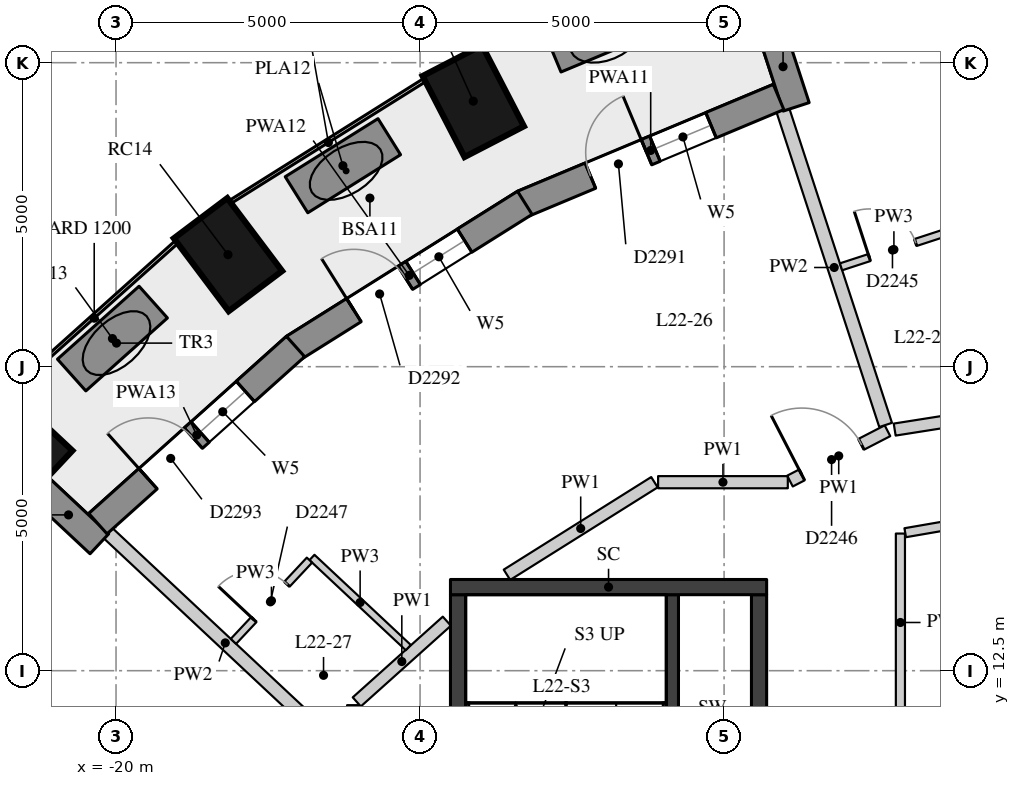
"""IFC4 building model, lengths in metres.
Left out: names, types, materials, properties, quantities, classifications, styles, units other than length and angle.
Written with IfcOpenShell. Run it as: python <this file> out.ifc"""

import sys

from ifc_helpers import new_model, si_unit, direction, frame, frame_2d, origin, origin_2d, place, context, subcontext, project, spatial, rectangle, extrude, element, fill, save


model = new_model("IFC4")
c1 = context("Model", 3, precision=1e-05, world=origin(), true_north=direction((0.0, 1.0)))
c2 = subcontext(c1, "Body", "Model", "MODEL_VIEW")
j1 = project(units=[si_unit("LENGTHUNIT", "METRE"), si_unit("PLANEANGLEUNIT", "RADIAN")], contexts=[c1])
p1 = place(None, origin())
s1 = spatial("IfcSite", under=j1, at=p1, CompositionType="ELEMENT")
p2 = place(p1, origin())
s2 = spatial("IfcBuilding", under=s1, at=p2, CompositionType="ELEMENT")
p3 = place(p2, frame((0.0, 0.0, 81.1)))
s3 = spatial("IfcBuildingStorey", under=s2, at=p3, CompositionType="ELEMENT", Elevation=81.1)
for number, where, z_axis, x_axis in (
    (1, (-14.125, 21.867, 0.0), (0.0, 0.0, 1.0), (-0.46, 0.888, 0.0)),
    (2, (-18.159, 19.343, 0.0), (0.0, 0.0, 1.0), (-0.601, 0.799, 0.0)),
    (3, (-21.641, 16.23, 0.0), (0.0, 0.0, 1.0), (-0.73, 0.683, 0.0)),
):
    element("IfcColumn", number, at=place(p3, frame(where, z_axis=z_axis, x_axis=x_axis)), inside=s3, PredefinedType="COLUMN", context=c2, shape_type="SweptSolid", body=[
        extrude(rectangle(XDim=1.5, YDim=1.1, at=origin_2d()), origin(), (0.0, 0.0, 1.0), 3.3),
    ])
p4 = place(p3, frame((-9.246, 23.095, 0.0), z_axis=(0.0, 0.0, 1.0), x_axis=(0.310110311429, -0.950700581017, 0.0)))
e4 = element("IfcWall", 4, at=p4, inside=s3, PredefinedType="SOLIDWALL", context=c2, shape_type="SweptSolid", body=[
    extrude(rectangle(XDim=1.39, YDim=0.45, at=frame_2d((0.695, 0.0))), origin(), (0.0, 0.0, 1.0), 2.85),
])
p5 = place(p3, frame((-21.289, 15.538, 0.0), z_axis=(0.0, 0.0, 1.0), x_axis=(0.730149942784, -0.683286953668, 0.0)))
e5 = element("IfcWall", 5, at=p5, inside=s3, PredefinedType="SOLIDWALL", context=c2, shape_type="SweptSolid", body=[
    extrude(rectangle(XDim=1.391, YDim=0.45, at=frame_2d((0.695, 0.0))), origin(), (0.0, 0.0, 1.0), 2.85),
])
p6 = place(p3, frame((-9.104, 21.936, 0.0), z_axis=(0.0, 0.0, 1.0), x_axis=(-0.922645368502, -0.385649483317, 0.0)))
e6 = element("IfcWall", 6, at=p6, inside=s3, PredefinedType="SOLIDWALL", context=c2, shape_type="SweptSolid", body=[
    extrude(rectangle(XDim=4.559, YDim=0.45, at=frame_2d((2.279, 0.0))), origin(), (0.0, 0.0, 1.0), 2.85),
])
p7 = place(p6, frame((1.204, 0.0, 0.4)))
e7 = element("IfcOpeningElement", 7, at=p7, cuts=e6, PredefinedType="OPENING", context=c2, shape_type="SweptSolid", body=[
    extrude(rectangle(XDim=1.0, YDim=1.75, at=frame_2d((0.5, 0.875))), frame((0.0, 0.235, 0.0), z_axis=(0.0, -1.0, 0.0), x_axis=(1.0, 0.0, 0.0)), (0.0, 0.0, 1.0), 0.47),
])
p8 = place(p6, frame((2.354, 0.0, 0.0)))
e8 = element("IfcOpeningElement", 8, at=p8, cuts=e6, PredefinedType="OPENING", context=c2, shape_type="SweptSolid", body=[
    extrude(rectangle(XDim=1.0, YDim=2.15, at=frame_2d((0.5, 1.075))), frame((0.0, 0.235, 0.0), z_axis=(0.0, -1.0, 0.0), x_axis=(1.0, 0.0, 0.0)), (0.0, 0.0, 1.0), 0.47),
])
p9 = place(p3, frame((-13.277, 20.195, 0.0), z_axis=(0.0, 0.0, 1.0), x_axis=(-0.846976005863, -0.531631117874, 0.0)))
e9 = element("IfcWall", 9, at=p9, inside=s3, PredefinedType="SOLIDWALL", context=c2, shape_type="SweptSolid", body=[
    extrude(rectangle(XDim=4.488, YDim=0.45, at=frame_2d((2.244, 0.0))), origin(), (0.0, 0.0, 1.0), 2.85),
])
p10 = place(p9, frame((1.169, 0.0, 0.4)))
e10 = element("IfcOpeningElement", 10, at=p10, cuts=e9, PredefinedType="OPENING", context=c2, shape_type="SweptSolid", body=[
    extrude(rectangle(XDim=1.0, YDim=1.75, at=frame_2d((0.5, 0.875))), frame((0.0, 0.235, 0.0), z_axis=(0.0, -1.0, 0.0), x_axis=(1.0, 0.0, 0.0)), (0.0, 0.0, 1.0), 0.47),
])
p11 = place(p9, frame((2.319, 0.0, 0.0)))
e11 = element("IfcOpeningElement", 11, at=p11, cuts=e9, PredefinedType="OPENING", context=c2, shape_type="SweptSolid", body=[
    extrude(rectangle(XDim=1.0, YDim=2.15, at=frame_2d((0.5, 1.075))), frame((0.0, 0.235, 0.0), z_axis=(0.0, -1.0, 0.0), x_axis=(1.0, 0.0, 0.0)), (0.0, 0.0, 1.0), 0.47),
])
p12 = place(p3, frame((-17.048, 17.832, 0.0), z_axis=(0.0, 0.0, 1.0), x_axis=(-0.744619286768, -0.667489413978, 0.0)))
e12 = element("IfcWall", 12, at=p12, inside=s3, PredefinedType="SOLIDWALL", context=c2, shape_type="SweptSolid", body=[
    extrude(rectangle(XDim=4.365, YDim=0.45, at=frame_2d((2.183, 0.0))), origin(), (0.0, 0.0, 1.0), 2.85),
])
p13 = place(p12, frame((1.107, 0.0, 0.4)))
e13 = element("IfcOpeningElement", 13, at=p13, cuts=e12, PredefinedType="OPENING", context=c2, shape_type="SweptSolid", body=[
    extrude(rectangle(XDim=1.0, YDim=1.75, at=frame_2d((0.5, 0.875))), frame((0.0, 0.235, 0.0), z_axis=(0.0, -1.0, 0.0), x_axis=(1.0, 0.0, 0.0)), (0.0, 0.0, 1.0), 0.47),
])
p14 = place(p12, frame((2.258, 0.0, 0.0)))
e14 = element("IfcOpeningElement", 14, at=p14, cuts=e12, PredefinedType="OPENING", context=c2, shape_type="SweptSolid", body=[
    extrude(rectangle(XDim=1.0, YDim=2.15, at=frame_2d((0.5, 1.075))), frame((0.0, 0.235, 0.0), z_axis=(0.0, -1.0, 0.0), x_axis=(1.0, 0.0, 0.0)), (0.0, 0.0, 1.0), 0.47),
])
p15 = place(p3, frame((-11.155, 23.362, 0.0), z_axis=(0.0, 0.0, 1.0), x_axis=(-0.923000660042, -0.384798364811, 0.0)))
e15 = element("IfcWall", 15, at=p15, inside=s3, PredefinedType="USERDEFINED", context=c2, shape_type="SweptSolid", body=[
    extrude(rectangle(XDim=1.8, YDim=0.7, at=frame_2d((0.9, 0.0))), origin(), (0.0, 0.0, 1.0), 0.75),
])
p16 = place(p3, frame((-15.506, 21.283, 0.0), z_axis=(0.0, 0.0, 1.0), x_axis=(-0.847609446823, -0.530620604252, 0.0)))
e16 = element("IfcWall", 16, at=p16, inside=s3, PredefinedType="USERDEFINED", context=c2, shape_type="SweptSolid", body=[
    extrude(rectangle(XDim=1.8, YDim=0.7, at=frame_2d((0.9, 0.0))), origin(), (0.0, 0.0, 1.0), 0.75),
])
p17 = place(p3, frame((-19.388, 18.562, 0.0), z_axis=(0.0, 0.0, 1.0), x_axis=(-0.745535653445, -0.666465745139, 0.0)))
e17 = element("IfcWall", 17, at=p17, inside=s3, PredefinedType="USERDEFINED", context=c2, shape_type="SweptSolid", body=[
    extrude(rectangle(XDim=1.8, YDim=0.7, at=frame_2d((0.9, 0.0))), origin(), (0.0, 0.0, 1.0), 0.75),
])
p18 = place(p3, frame((-10.85, 7.75, 0.0), z_axis=(0.0, 0.0, 1.0), x_axis=(0.0, 1.0, 0.0)))
e18 = element("IfcWall", 18, at=p18, inside=s3, PredefinedType="SHEAR", context=c2, shape_type="SweptSolid", body=[
    extrude(rectangle(XDim=6.0, YDim=0.2, at=frame_2d((3.0, 0.0))), origin(), (0.0, 0.0, 1.0), 2.85),
])
p19 = place(p18, frame((0.1, 0.0, 0.0)))
e19 = element("IfcOpeningElement", 19, at=p19, cuts=e18, PredefinedType="OPENING", context=c2, shape_type="SweptSolid", body=[
    extrude(rectangle(XDim=1.5, YDim=2.1, at=frame_2d((0.75, 1.05))), frame((0.0, 0.11, 0.0), z_axis=(0.0, -1.0, 0.0), x_axis=(1.0, 0.0, 0.0)), (0.0, 0.0, 1.0), 0.22),
])
p20 = place(p3, frame((-14.375, 7.75, -0.28), z_axis=(0.0, 0.0, 1.0), x_axis=(0.0, 1.0, 0.0)))
e20 = element("IfcWall", 20, at=p20, inside=s3, PredefinedType="SHEAR", context=c2, shape_type="SweptSolid", body=[
    extrude(rectangle(XDim=6.0, YDim=0.25, at=frame_2d((3.0, 0.0))), origin(), (0.0, 0.0, 1.0), 3.13),
])
p21 = place(p3, frame((-9.425, 7.75, -0.28), z_axis=(0.0, 0.0, 1.0), x_axis=(0.0, 1.0, 0.0)))
e21 = element("IfcWall", 21, at=p21, inside=s3, PredefinedType="SHEAR", context=c2, shape_type="SweptSolid", body=[
    extrude(rectangle(XDim=6.0, YDim=0.25, at=frame_2d((3.0, 0.0))), origin(), (0.0, 0.0, 1.0), 3.13),
])
p22 = place(p21, frame((2.1, 0.0, 0.28)))
e22 = element("IfcOpeningElement", 22, at=p22, cuts=e21, PredefinedType="OPENING", context=c2, shape_type="SweptSolid", body=[
    extrude(rectangle(XDim=1.5, YDim=2.1, at=frame_2d((0.75, 1.05))), frame((0.0, 0.135, 0.0), z_axis=(0.0, -1.0, 0.0), x_axis=(1.0, 0.0, 0.0)), (0.0, 0.0, 1.0), 0.27),
])
p23 = place(p3, frame((-14.5, 13.875, -0.28), z_axis=(0.0, 0.0, 1.0), x_axis=(1.0, 0.0, 0.0)))
e23 = element("IfcWall", 23, at=p23, inside=s3, PredefinedType="SHEAR", context=c2, shape_type="SweptSolid", body=[
    extrude(rectangle(XDim=5.2, YDim=0.25, at=frame_2d((2.6, 0.0))), origin(), (0.0, 0.0, 1.0), 3.13),
])
p24 = place(p3, frame((-16.1, 10.592, 0.0), z_axis=(0.0, 0.0, 1.0), x_axis=(0.0, 1.0, 0.0)))
e24 = element("IfcWall", 24, at=p24, inside=s3, PredefinedType="PARTITIONING", context=c2, shape_type="SweptSolid", body=[
    extrude(rectangle(XDim=1.341, YDim=0.2, at=frame_2d((0.67, 0.0))), origin(), (0.0, 0.0, 1.0), 2.85),
])
p25 = place(p3, frame((-16.041, 11.987, 0.0), z_axis=(0.0, 0.0, 1.0), x_axis=(0.744714584968, 0.66738308859, 0.0)))
e25 = element("IfcWall", 25, at=p25, inside=s3, PredefinedType="PARTITIONING", context=c2, shape_type="SweptSolid", body=[
    extrude(rectangle(XDim=1.989, YDim=0.2, at=frame_2d((0.995, 0.0))), origin(), (0.0, 0.0, 1.0), 2.85),
])
p26 = place(p3, frame((-13.571, 14.077, 0.0), z_axis=(0.0, 0.0, 1.0), x_axis=(0.84693819774, 0.53169134769, 0.0)))
e26 = element("IfcWall", 26, at=p26, inside=s3, PredefinedType="PARTITIONING", context=c2, shape_type="SweptSolid", body=[
    extrude(rectangle(XDim=2.864, YDim=0.2, at=frame_2d((1.432, 0.0))), origin(), (0.0, 0.0, 1.0), 2.85),
])
p27 = place(p3, frame((-11.085, 15.6, 0.0), z_axis=(0.0, 0.0, 1.0), x_axis=(1.0, 0.0, 0.0)))
e27 = element("IfcWall", 27, at=p27, inside=s3, PredefinedType="PARTITIONING", context=c2, shape_type="SweptSolid", body=[
    extrude(rectangle(XDim=2.133, YDim=0.2, at=frame_2d((1.067, 0.0))), origin(), (0.0, 0.0, 1.0), 2.85),
])
p28 = place(p3, frame((-8.916, 15.619, 0.0), z_axis=(0.0, 0.0, 1.0), x_axis=(0.88856195521, 0.458756636741, 0.0)))
e28 = element("IfcWall", 28, at=p28, inside=s3, PredefinedType="PARTITIONING", context=c2, shape_type="SweptSolid", body=[
    extrude(rectangle(XDim=1.805, YDim=0.2, at=frame_2d((0.902, 0.0))), origin(), (0.0, 0.0, 1.0), 2.85),
])
p29 = place(p28, frame((0.22, 0.0, 0.0)))
e29 = element("IfcOpeningElement", 29, at=p29, cuts=e28, PredefinedType="OPENING", context=c2, shape_type="SweptSolid", body=[
    extrude(rectangle(XDim=1.1, YDim=2.1, at=frame_2d((0.55, 1.05))), frame((0.0, 0.11, 0.0), z_axis=(0.0, -1.0, 0.0), x_axis=(1.0, 0.0, 0.0)), (0.0, 0.0, 1.0), 0.22),
])
p30 = place(p3, frame((-7.194, 16.466, 0.0), z_axis=(0.0, 0.0, 1.0), x_axis=(0.987792302219, 0.155776659599, 0.0)))
e30 = element("IfcWall", 30, at=p30, inside=s3, PredefinedType="PARTITIONING", context=c2, shape_type="SweptSolid", body=[
    extrude(rectangle(XDim=7.283, YDim=0.2, at=frame_2d((3.642, 0.0))), origin(), (0.0, 0.0, 1.0), 2.85),
])
p31 = place(p30, frame((2.27, 0.0, 0.0)))
e31 = element("IfcOpeningElement", 31, at=p31, cuts=e30, PredefinedType="OPENING", context=c2, shape_type="SweptSolid", body=[
    extrude(rectangle(XDim=1.1, YDim=2.1, at=frame_2d((0.55, 1.05))), frame((0.0, 0.11, 0.0), z_axis=(0.0, -1.0, 0.0), x_axis=(1.0, 0.0, 0.0)), (0.0, 0.0, 1.0), 0.22),
])
p32 = place(p3, frame((-7.1, 11.83, 0.0), z_axis=(0.0, 0.0, 1.0), x_axis=(0.0, 1.0, 0.0)))
e32 = element("IfcWall", 32, at=p32, inside=s3, PredefinedType="PARTITIONING", context=c2, shape_type="SweptSolid", body=[
    extrude(rectangle(XDim=2.926, YDim=0.15, at=frame_2d((1.463, 0.0))), origin(), (0.0, 0.0, 1.0), 2.85),
])
p33 = place(p3, frame((-7.021, 14.769, 0.0), z_axis=(0.0, 0.0, 1.0), x_axis=(0.985427060344, 0.170098526569, 0.0)))
e33 = element("IfcWall", 33, at=p33, inside=s3, PredefinedType="PARTITIONING", context=c2, shape_type="SweptSolid", body=[
    extrude(rectangle(XDim=7.04, YDim=0.15, at=frame_2d((3.52, 0.0))), origin(), (0.0, 0.0, 1.0), 2.4),
])
p34 = place(p3, frame((-9.034, 21.721, 0.0), z_axis=(0.0, 0.0, 1.0), x_axis=(0.310306747299, -0.950636482879, 0.0)))
e34 = element("IfcWall", 34, at=p34, inside=s3, PredefinedType="PARTITIONING", context=c2, shape_type="SweptSolid", body=[
    extrude(rectangle(XDim=5.448, YDim=0.22, at=frame_2d((2.724, 0.0))), origin(), (0.0, 0.0, 1.0), 2.85),
])
p35 = place(p3, frame((-20.133, 14.764, 0.0), z_axis=(0.0, 0.0, 1.0), x_axis=(0.730064043032, -0.68337873326, 0.0)))
e35 = element("IfcWall", 35, at=p35, inside=s3, PredefinedType="PARTITIONING", context=c2, shape_type="SweptSolid", body=[
    extrude(rectangle(XDim=5.287, YDim=0.22, at=frame_2d((2.644, 0.0))), origin(), (0.0, 0.0, 1.0), 2.85),
])
p36 = place(p3, frame((-15.194, 12.88, 0.0), z_axis=(0.0, 0.0, 1.0), x_axis=(-0.730070370792, 0.683371973153, 0.0)))
e36 = element("IfcWall", 36, at=p36, inside=s3, PredefinedType="PARTITIONING", context=c2, shape_type="SweptSolid", body=[
    extrude(rectangle(XDim=2.17, YDim=0.12, at=frame_2d((1.085, 0.0))), origin(), (0.0, 0.0, 1.0), 2.85),
])
p37 = place(p3, frame((-6.337, 19.71, 0.0), z_axis=(0.0, 0.0, 1.0), x_axis=(-0.950626343776, -0.310337807105, 0.0)))
e37 = element("IfcWall", 37, at=p37, inside=s3, PredefinedType="PARTITIONING", context=c2, shape_type="SweptSolid", body=[
    extrude(rectangle(XDim=1.83, YDim=0.12, at=frame_2d((0.915, 0.0))), origin(), (0.0, 0.0, 1.0), 2.85),
])
p38 = place(p37, frame((0.54, 0.0, 0.0)))
e38 = element("IfcOpeningElement", 38, at=p38, cuts=e37, PredefinedType="OPENING", context=c2, shape_type="SweptSolid", body=[
    extrude(rectangle(XDim=0.8, YDim=2.1, at=frame_2d((0.4, 1.05))), frame((0.0, 0.07, 0.0), z_axis=(0.0, -1.0, 0.0), x_axis=(1.0, 0.0, 0.0)), (0.0, 0.0, 1.0), 0.14),
])
p39 = place(p3, frame((-16.819, 14.319, 0.0), z_axis=(0.0, 0.0, 1.0), x_axis=(-0.683372850006, -0.730069550026, 0.0)))
e39 = element("IfcWall", 39, at=p39, inside=s3, PredefinedType="PARTITIONING", context=c2, shape_type="SweptSolid", body=[
    extrude(rectangle(XDim=1.83, YDim=0.12, at=frame_2d((0.915, 0.0))), origin(), (0.0, 0.0, 1.0), 2.85),
])
p40 = place(p39, frame((0.54, 0.0, 0.0)))
e40 = element("IfcOpeningElement", 40, at=p40, cuts=e39, PredefinedType="OPENING", context=c2, shape_type="SweptSolid", body=[
    extrude(rectangle(XDim=0.8, YDim=2.1, at=frame_2d((0.4, 1.05))), frame((0.0, 0.07, 0.0), z_axis=(0.0, -1.0, 0.0), x_axis=(1.0, 0.0, 0.0)), (0.0, 0.0, 1.0), 0.14),
])
p41 = place(p7, origin())
e41 = element("IfcWindow", 41, at=p41, inside=s3, PartitioningType="SINGLE_PANEL", PredefinedType="WINDOW", context=c2, shape_type="SweptSolid", body=[
    extrude(rectangle(XDim=1.0, YDim=1.75, at=frame_2d((0.5, 0.875))), frame((0.0, 0.035, 0.0), z_axis=(0.0, -1.0, 0.0), x_axis=(1.0, 0.0, 0.0)), (0.0, 0.0, 1.0), 0.06),
])
fill(e7, e41)
p42 = place(p8, frame((1.0, 0.0, 0.0), z_axis=(0.0, 0.0, 1.0), x_axis=(-1.0, 0.0, 0.0)))
e42 = element("IfcDoor", 42, at=p42, inside=s3, OperationType="SINGLE_SWING_RIGHT", PredefinedType="DOOR", context=c2, shape_type="SweptSolid", body=[
    extrude(rectangle(XDim=1.0, YDim=2.15, at=frame_2d((0.5, 1.075))), frame((0.0, 0.075, 0.0), z_axis=(0.0, -1.0, 0.0), x_axis=(1.0, 0.0, 0.0)), (0.0, 0.0, 1.0), 0.05),
])
fill(e8, e42)
p43 = place(p10, origin())
e43 = element("IfcWindow", 43, at=p43, inside=s3, PartitioningType="SINGLE_PANEL", PredefinedType="WINDOW", context=c2, shape_type="SweptSolid", body=[
    extrude(rectangle(XDim=1.0, YDim=1.75, at=frame_2d((0.5, 0.875))), frame((0.0, 0.035, 0.0), z_axis=(0.0, -1.0, 0.0), x_axis=(1.0, 0.0, 0.0)), (0.0, 0.0, 1.0), 0.06),
])
fill(e10, e43)
p44 = place(p11, frame((1.0, 0.0, 0.0), z_axis=(0.0, 0.0, 1.0), x_axis=(-1.0, 0.0, 0.0)))
e44 = element("IfcDoor", 44, at=p44, inside=s3, OperationType="SINGLE_SWING_LEFT", PredefinedType="DOOR", context=c2, shape_type="SweptSolid", body=[
    extrude(rectangle(XDim=1.0, YDim=2.15, at=frame_2d((0.5, 1.075))), frame((0.0, 0.075, 0.0), z_axis=(0.0, -1.0, 0.0), x_axis=(1.0, 0.0, 0.0)), (0.0, 0.0, 1.0), 0.05),
])
fill(e11, e44)
p45 = place(p13, origin())
e45 = element("IfcWindow", 45, at=p45, inside=s3, PartitioningType="SINGLE_PANEL", PredefinedType="WINDOW", context=c2, shape_type="SweptSolid", body=[
    extrude(rectangle(XDim=1.0, YDim=1.75, at=frame_2d((0.5, 0.875))), frame((0.0, 0.035, 0.0), z_axis=(0.0, -1.0, 0.0), x_axis=(1.0, 0.0, 0.0)), (0.0, 0.0, 1.0), 0.06),
])
fill(e13, e45)
p46 = place(p14, frame((1.0, 0.0, 0.0), z_axis=(0.0, 0.0, 1.0), x_axis=(-1.0, 0.0, 0.0)))
e46 = element("IfcDoor", 46, at=p46, inside=s3, OperationType="SINGLE_SWING_LEFT", PredefinedType="DOOR", context=c2, shape_type="SweptSolid", body=[
    extrude(rectangle(XDim=1.0, YDim=2.15, at=frame_2d((0.5, 1.075))), frame((0.0, 0.075, 0.0), z_axis=(0.0, -1.0, 0.0), x_axis=(1.0, 0.0, 0.0)), (0.0, 0.0, 1.0), 0.05),
])
fill(e14, e46)
p47 = place(p38, origin())
e47 = element("IfcDoor", 47, at=p47, inside=s3, OperationType="SINGLE_SWING_LEFT", PredefinedType="DOOR", context=c2, shape_type="SweptSolid", body=[
    extrude(rectangle(XDim=0.8, YDim=2.1, at=frame_2d((0.4, 1.05))), frame((0.0, 0.025, 0.0), z_axis=(0.0, -1.0, 0.0), x_axis=(1.0, 0.0, 0.0)), (0.0, 0.0, 1.0), 0.05),
])
fill(e38, e47)
p48 = place(p29, origin())
e48 = element("IfcDoor", 48, at=p48, inside=s3, OperationType="SINGLE_SWING_LEFT", PredefinedType="DOOR", context=c2, shape_type="SweptSolid", body=[
    extrude(rectangle(XDim=1.1, YDim=2.1, at=frame_2d((0.55, 1.05))), frame((0.0, 0.025, 0.0), z_axis=(0.0, -1.0, 0.0), x_axis=(1.0, 0.0, 0.0)), (0.0, 0.0, 1.0), 0.05),
])
fill(e29, e48)
p49 = place(p40, origin())
e49 = element("IfcDoor", 49, at=p49, inside=s3, OperationType="SINGLE_SWING_LEFT", PredefinedType="DOOR", context=c2, shape_type="SweptSolid", body=[
    extrude(rectangle(XDim=0.8, YDim=2.1, at=frame_2d((0.4, 1.05))), frame((0.0, 0.025, 0.0), z_axis=(0.0, -1.0, 0.0), x_axis=(1.0, 0.0, 0.0)), (0.0, 0.0, 1.0), 0.05),
])
fill(e40, e49)
save(model, sys.argv[1])
